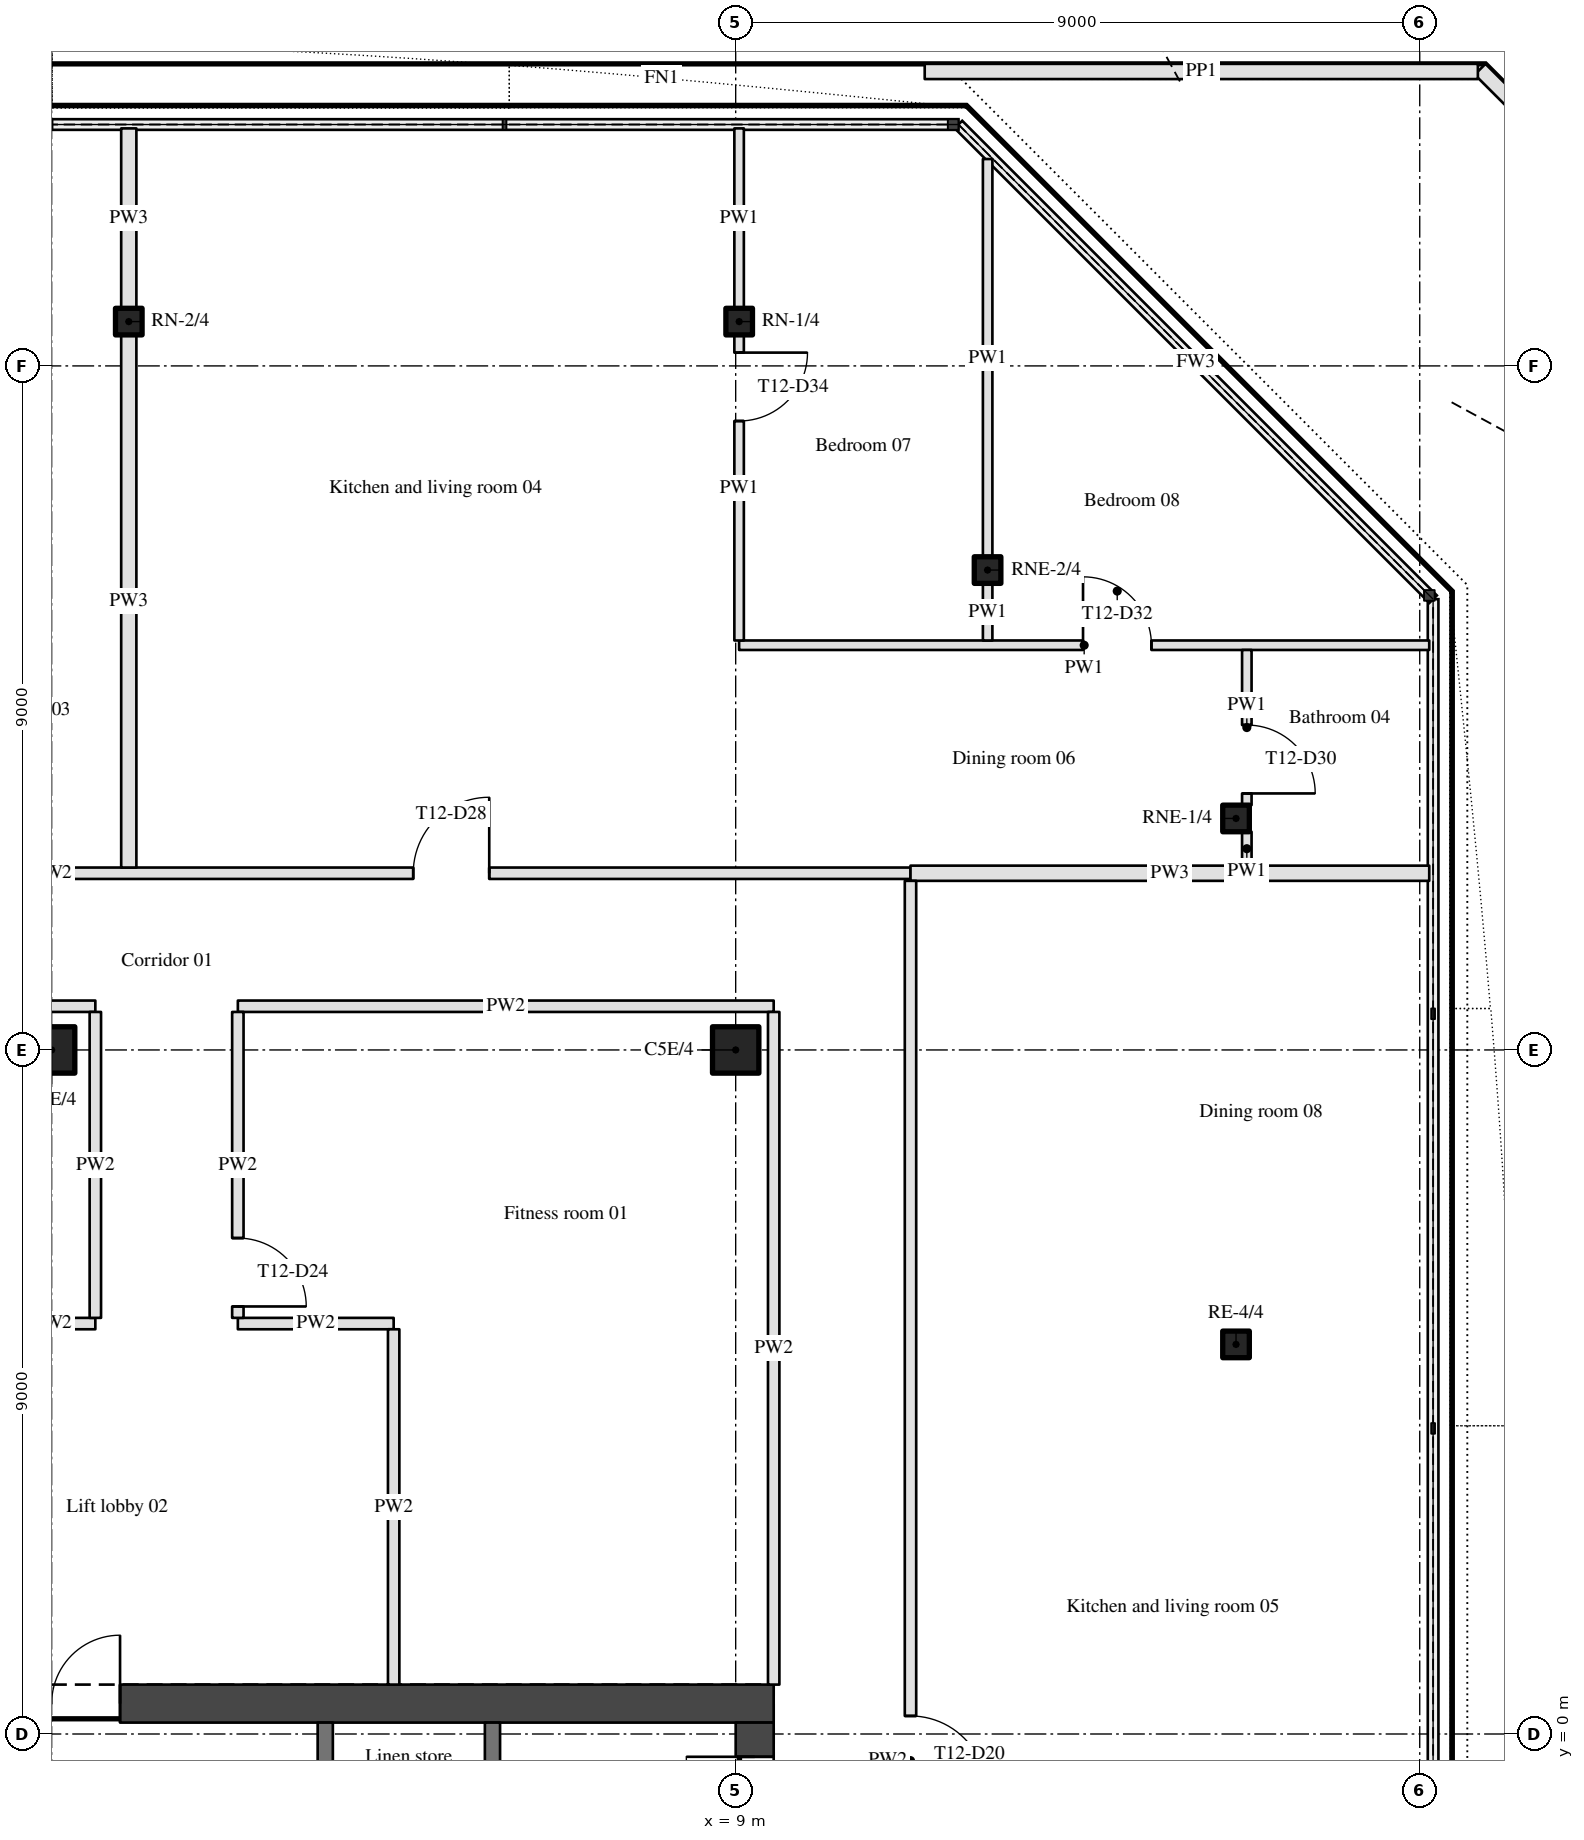
"""IFC4 building model, lengths in metres.
Left out: names, types, materials, properties, quantities, classifications, styles, units other than length and angle.
Written with IfcOpenShell. Run it as: python <this file> out.ifc"""

import sys

from ifc_helpers import new_model, si_unit, direction, frame, frame_2d, origin, origin_2d, place, context, subcontext, project, spatial, rectangle, hollow_rectangle, hollow_circle, extrude, element, fill, save


model = new_model("IFC4")
c1 = context("Model", 3, precision=1e-05, world=origin(), true_north=direction((0.0, 1.0)))
c2 = subcontext(c1, "Body", "Model", "MODEL_VIEW")
j1 = project(units=[si_unit("LENGTHUNIT", "METRE"), si_unit("PLANEANGLEUNIT", "RADIAN")], contexts=[c1])
p1 = place(None, origin())
s1 = spatial("IfcSite", under=j1, at=p1, CompositionType="ELEMENT")
p2 = place(p1, origin())
s2 = spatial("IfcBuilding", under=s1, at=p2, CompositionType="ELEMENT")
p3 = place(p2, frame((0.0, 0.0, 172.2)))
s3 = spatial("IfcBuildingStorey", under=s2, at=p3, CompositionType="ELEMENT", Elevation=172.2)
for number, where, z_axis, x_axis in (
    (1, (0.0, 9.0, 0.0), (0.0, 0.0, 1.0), (1.0, 0.0, 0.0)),
    (2, (9.0, 9.0, 0.0), (0.0, 0.0, 1.0), (1.0, 0.0, 0.0)),
):
    element("IfcColumn", number, at=place(p3, frame(where, z_axis=z_axis, x_axis=x_axis)), inside=s3, PredefinedType="COLUMN", context=c2, shape_type="SweptSolid", body=[
        extrude(hollow_circle(Radius=0.305, WallThickness=0.03, at=origin_2d()), origin(), (0.0, 0.0, 1.0), 3.15),
    ])
for number, where, z_axis, x_axis in (
    (3, (15.583, 5.126, 0.0), (0.0, 0.0, 1.0), (1.0, 0.0, 0.0)),
    (4, (15.583, 12.046, 0.0), (0.0, 0.0, 1.0), (1.0, 0.0, 0.0)),
    (5, (12.314, 15.314, 0.0), (0.0, 0.0, 1.0), (1.0, 0.0, 0.0)),
    (6, (9.046, 18.583, 0.0), (0.0, 0.0, 1.0), (1.0, 0.0, 0.0)),
    (7, (1.015, 18.583, 0.0), (0.0, 0.0, 1.0), (1.0, 0.0, 0.0)),
):
    element("IfcColumn", number, at=place(p3, frame(where, z_axis=z_axis, x_axis=x_axis)), inside=s3, PredefinedType="COLUMN", context=c2, shape_type="SweptSolid", body=[
        extrude(hollow_rectangle(XDim=0.35, YDim=0.35, WallThickness=0.02, InnerFilletRadius=0.03, OuterFilletRadius=0.05, at=origin_2d()), origin(), (0.0, 0.0, 1.0), 3.15),
    ])
p4 = place(p3, frame((-9.5, 0.4, 0.0), z_axis=(0.0, 0.0, 1.0), x_axis=(1.0, 0.0, 0.0)))
e8 = element("IfcWall", 8, at=p4, inside=s3, PredefinedType="SHEAR", context=c2, shape_type="SweptSolid", body=[
    extrude(rectangle(XDim=19.0, YDim=0.5, at=frame_2d((9.5, 0.0))), origin(), (0.0, 0.0, 1.0), 3.15),
])
p5 = place(p4, frame((8.6, 0.0, 0.0)))
e9 = element("IfcOpeningElement", 9, at=p5, cuts=e8, PredefinedType="OPENING", context=c2, shape_type="SweptSolid", body=[
    extrude(rectangle(XDim=1.8, YDim=2.1, at=frame_2d((0.9, 1.05))), frame((0.0, 0.26, 0.0), z_axis=(0.0, -1.0, 0.0), x_axis=(1.0, 0.0, 0.0)), (0.0, 0.0, 1.0), 0.52),
])
p6 = place(p3, frame((9.25, -11.5, 0.0), z_axis=(0.0, 0.0, 1.0), x_axis=(0.0, 1.0, 0.0)))
e10 = element("IfcWall", 10, at=p6, inside=s3, PredefinedType="SHEAR", context=c2, shape_type="SweptSolid", body=[
    extrude(rectangle(XDim=11.65, YDim=0.5, at=frame_2d((5.825, 0.0))), origin(), (0.0, 0.0, 1.0), 3.15),
])
p7 = place(p6, frame((9.4, 0.0, 0.0)))
e11 = element("IfcOpeningElement", 11, at=p7, cuts=e10, PredefinedType="OPENING", context=c2, shape_type="SweptSolid", body=[
    extrude(rectangle(XDim=1.8, YDim=2.1, at=frame_2d((0.9, 1.05))), frame((0.0, 0.26, 0.0), z_axis=(0.0, -1.0, 0.0), x_axis=(1.0, 0.0, 0.0)), (0.0, 0.0, 1.0), 0.52),
])
p8 = place(p3, frame((24.833, 15.865, 0.0), z_axis=(0.0, 0.0, 1.0), x_axis=(-0.707106781187, 0.707106781187, 0.0)))
e12 = element("IfcWall", 12, at=p8, inside=s3, PredefinedType="PARAPET", context=c2, shape_type="SweptSolid", body=[
    extrude(rectangle(XDim=8.54, YDim=0.2, at=frame_2d((4.27, 0.0))), origin(), (0.0, 0.0, 1.0), 1.0),
])
p9 = place(p3, frame((18.765, 21.874, 0.0), z_axis=(0.0, 0.0, 1.0), x_axis=(-1.0, 0.0, 0.0)))
e13 = element("IfcWall", 13, at=p9, inside=s3, PredefinedType="PARAPET", context=c2, shape_type="SweptSolid", body=[
    extrude(rectangle(XDim=7.278, YDim=0.2, at=frame_2d((3.639, 0.0))), origin(), (0.0, 0.0, 1.0), 1.0),
])
p10 = place(p3, frame((-0.55, 5.4, 0.0), z_axis=(0.0, 0.0, 1.0), x_axis=(1.0, 0.0, 0.0)))
e14 = element("IfcWall", 14, at=p10, inside=s3, PredefinedType="PARTITIONING", context=c2, shape_type="SweptSolid", body=[
    extrude(rectangle(XDim=1.125, YDim=0.15, at=frame_2d((0.562, 0.0))), origin(), (0.0, 0.0, 1.0), 2.21),
])
p11 = place(p3, frame((2.45, 5.4, 0.0), z_axis=(0.0, 0.0, 1.0), x_axis=(1.0, 0.0, 0.0)))
e15 = element("IfcWall", 15, at=p11, inside=s3, PredefinedType="PARTITIONING", context=c2, shape_type="SweptSolid", body=[
    extrude(rectangle(XDim=2.05, YDim=0.15, at=frame_2d((1.025, 0.0))), origin(), (0.0, 0.0, 1.0), 2.21),
])
p12 = place(p3, frame((0.575, 9.575, 0.0), z_axis=(0.0, 0.0, 1.0), x_axis=(-1.0, 0.0, 0.0)))
e16 = element("IfcWall", 16, at=p12, inside=s3, PredefinedType="PARTITIONING", context=c2, shape_type="SweptSolid", body=[
    extrude(rectangle(XDim=10.075, YDim=0.15, at=frame_2d((5.038, 0.0))), origin(), (0.0, 0.0, 1.0), 2.21),
])
p13 = place(p12, frame((8.125, 0.0, 0.0)))
e17 = element("IfcOpeningElement", 17, at=p13, cuts=e16, PredefinedType="OPENING", context=c2, shape_type="SweptSolid", body=[
    extrude(rectangle(XDim=0.9, YDim=2.1, at=frame_2d((0.45, 1.05))), frame((0.0, 0.085, 0.0), z_axis=(0.0, -1.0, 0.0), x_axis=(1.0, 0.0, 0.0)), (0.0, 0.0, 1.0), 0.17),
])
p14 = place(p3, frame((2.45, 9.575, 0.0), z_axis=(0.0, 0.0, 1.0), x_axis=(1.0, 0.0, 0.0)))
e18 = element("IfcWall", 18, at=p14, inside=s3, PredefinedType="PARTITIONING", context=c2, shape_type="SweptSolid", body=[
    extrude(rectangle(XDim=7.05, YDim=0.15, at=frame_2d((3.525, 0.0))), origin(), (0.0, 0.0, 1.0), 2.21),
])
p15 = place(p3, frame((-11.275, 11.325, 0.0), z_axis=(0.0, 0.0, 1.0), x_axis=(1.0, 0.0, 0.0)))
e19 = element("IfcWall", 19, at=p15, inside=s3, PredefinedType="PARTITIONING", context=c2, shape_type="SweptSolid", body=[
    extrude(rectangle(XDim=22.575, YDim=0.15, at=frame_2d((11.288, 0.0))), origin(), (0.0, 0.0, 1.0), 2.21),
])
p16 = place(p15, frame((6.795, 0.0, 0.0)))
e20 = element("IfcOpeningElement", 20, at=p16, cuts=e19, PredefinedType="OPENING", context=c2, shape_type="SweptSolid", body=[
    extrude(rectangle(XDim=1.0, YDim=2.1, at=frame_2d((0.5, 1.05))), frame((0.0, 0.085, 0.0), z_axis=(0.0, -1.0, 0.0), x_axis=(1.0, 0.0, 0.0)), (0.0, 0.0, 1.0), 0.17),
])
p17 = place(p15, frame((16.032, 0.0, 0.0)))
e21 = element("IfcOpeningElement", 21, at=p17, cuts=e19, PredefinedType="OPENING", context=c2, shape_type="SweptSolid", body=[
    extrude(rectangle(XDim=1.0, YDim=2.1, at=frame_2d((0.5, 1.05))), frame((0.0, 0.085, 0.0), z_axis=(0.0, -1.0, 0.0), x_axis=(1.0, 0.0, 0.0)), (0.0, 0.0, 1.0), 0.17),
])
p18 = place(p3, frame((11.3, 11.325, 0.0), z_axis=(0.0, 0.0, 1.0), x_axis=(1.0, 0.0, 0.0)))
e22 = element("IfcWall", 22, at=p18, inside=s3, PredefinedType="PARTITIONING", context=c2, shape_type="SweptSolid", body=[
    extrude(rectangle(XDim=6.825, YDim=0.2, at=frame_2d((3.413, 0.0))), origin(), (0.0, 0.0, 1.0), 2.21),
])
p19 = place(p3, frame((9.045, 14.325, 0.0), z_axis=(0.0, 0.0, 1.0), x_axis=(1.0, 0.0, 0.0)))
e23 = element("IfcWall", 23, at=p19, inside=s3, PredefinedType="PARTITIONING", context=c2, shape_type="SweptSolid", body=[
    extrude(rectangle(XDim=9.08, YDim=0.125, at=frame_2d((4.54, 0.0))), origin(), (0.0, 0.0, 1.0), 2.21),
])
p20 = place(p19, frame((4.525, 0.0, 0.0)))
e24 = element("IfcOpeningElement", 24, at=p20, cuts=e23, PredefinedType="OPENING", context=c2, shape_type="SweptSolid", body=[
    extrude(rectangle(XDim=0.9, YDim=2.1, at=frame_2d((0.45, 1.05))), frame((0.0, 0.073, 0.0), z_axis=(0.0, -1.0, 0.0), x_axis=(1.0, 0.0, 0.0)), (0.0, 0.0, 1.0), 0.145),
])
p21 = place(p3, frame((0.575, 5.475, 0.0), z_axis=(0.0, 0.0, 1.0), x_axis=(0.0, 1.0, 0.0)))
e25 = element("IfcWall", 25, at=p21, inside=s3, PredefinedType="PARTITIONING", context=c2, shape_type="SweptSolid", body=[
    extrude(rectangle(XDim=4.025, YDim=0.15, at=frame_2d((2.012, 0.0))), origin(), (0.0, 0.0, 1.0), 2.21),
])
p22 = place(p3, frame((1.015, 11.4, 0.0), z_axis=(0.0, 0.0, 1.0), x_axis=(0.0, 1.0, 0.0)))
e26 = element("IfcWall", 26, at=p22, inside=s3, PredefinedType="PARTITIONING", context=c2, shape_type="SweptSolid", body=[
    extrude(rectangle(XDim=7.008, YDim=0.2, at=frame_2d((3.504, 0.0))), origin(), (0.0, 0.0, 1.0), 2.21),
])
p23 = place(p3, frame((1.015, 18.758, 0.0), z_axis=(0.0, 0.0, 1.0), x_axis=(0.0, 1.0, 0.0)))
e27 = element("IfcWall", 27, at=p23, inside=s3, PredefinedType="PARTITIONING", context=c2, shape_type="SweptSolid", body=[
    extrude(rectangle(XDim=2.367, YDim=0.2, at=frame_2d((1.184, 0.0))), origin(), (0.0, 0.0, 1.0), 2.21),
])
p24 = place(p3, frame((2.45, 9.5, 0.0), z_axis=(0.0, 0.0, 1.0), x_axis=(0.0, -1.0, 0.0)))
e28 = element("IfcWall", 28, at=p24, inside=s3, PredefinedType="PARTITIONING", context=c2, shape_type="SweptSolid", body=[
    extrude(rectangle(XDim=4.025, YDim=0.15, at=frame_2d((2.012, 0.0))), origin(), (0.0, 0.0, 1.0), 2.21),
])
p25 = place(p24, frame((2.975, 0.0, 0.0)))
e29 = element("IfcOpeningElement", 29, at=p25, cuts=e28, PredefinedType="OPENING", context=c2, shape_type="SweptSolid", body=[
    extrude(rectangle(XDim=0.9, YDim=2.1, at=frame_2d((0.45, 1.05))), frame((0.0, 0.085, 0.0), z_axis=(0.0, -1.0, 0.0), x_axis=(1.0, 0.0, 0.0)), (0.0, 0.0, 1.0), 0.17),
])
p26 = place(p3, frame((3.6, -1.1, 0.0), z_axis=(0.0, 0.0, 1.0), x_axis=(0.0, 1.0, 0.0)))
e30 = element("IfcWall", 30, at=p26, inside=s3, PredefinedType="SOLIDWALL", context=c2, shape_type="SweptSolid", body=[
    extrude(rectangle(XDim=1.25, YDim=0.2, at=frame_2d((0.625, 0.0))), origin(), (0.0, 0.0, 1.0), 2.85),
])
p27 = place(p3, frame((4.5, 0.65, 0.0), z_axis=(0.0, 0.0, 1.0), x_axis=(0.0, 1.0, 0.0)))
e31 = element("IfcWall", 31, at=p27, inside=s3, PredefinedType="PARTITIONING", context=c2, shape_type="SweptSolid", body=[
    extrude(rectangle(XDim=4.675, YDim=0.15, at=frame_2d((2.337, 0.0))), origin(), (0.0, 0.0, 1.0), 2.21),
])
p28 = place(p3, frame((5.8, -1.1, 0.0), z_axis=(0.0, 0.0, 1.0), x_axis=(0.0, 1.0, 0.0)))
e32 = element("IfcWall", 32, at=p28, inside=s3, PredefinedType="SOLIDWALL", context=c2, shape_type="SweptSolid", body=[
    extrude(rectangle(XDim=1.25, YDim=0.2, at=frame_2d((0.625, 0.0))), origin(), (0.0, 0.0, 1.0), 2.85),
])
p29 = place(p3, frame((9.045, 18.408, 0.0), z_axis=(0.0, 0.0, 1.0), x_axis=(0.0, -1.0, 0.0)))
e33 = element("IfcWall", 33, at=p29, inside=s3, PredefinedType="PARTITIONING", context=c2, shape_type="SweptSolid", body=[
    extrude(rectangle(XDim=4.021, YDim=0.125, at=frame_2d((2.01, 0.0))), origin(), (0.0, 0.0, 1.0), 2.21),
])
p30 = place(p29, frame((0.233, 0.0, 0.0)))
e34 = element("IfcOpeningElement", 34, at=p30, cuts=e33, PredefinedType="OPENING", context=c2, shape_type="SweptSolid", body=[
    extrude(rectangle(XDim=0.9, YDim=2.1, at=frame_2d((0.45, 1.05))), frame((0.0, 0.073, 0.0), z_axis=(0.0, -1.0, 0.0), x_axis=(1.0, 0.0, 0.0)), (0.0, 0.0, 1.0), 0.145),
])
p31 = place(p3, frame((9.045, 18.758, 0.0), z_axis=(0.0, 0.0, 1.0), x_axis=(0.0, 1.0, 0.0)))
e35 = element("IfcWall", 35, at=p31, inside=s3, PredefinedType="PARTITIONING", context=c2, shape_type="SweptSolid", body=[
    extrude(rectangle(XDim=2.367, YDim=0.125, at=frame_2d((1.184, 0.0))), origin(), (0.0, 0.0, 1.0), 2.21),
])
p32 = place(p3, frame((9.5, 0.65, 0.0), z_axis=(0.0, 0.0, 1.0), x_axis=(0.0, 1.0, 0.0)))
e36 = element("IfcWall", 36, at=p32, inside=s3, PredefinedType="PARTITIONING", context=c2, shape_type="SweptSolid", body=[
    extrude(rectangle(XDim=8.85, YDim=0.15, at=frame_2d((4.425, 0.0))), origin(), (0.0, 0.0, 1.0), 2.21),
])
p33 = place(p3, frame((11.3, 11.225, 0.0), z_axis=(0.0, 0.0, 1.0), x_axis=(0.0, -1.0, 0.0)))
e37 = element("IfcWall", 37, at=p33, inside=s3, PredefinedType="PARTITIONING", context=c2, shape_type="SweptSolid", body=[
    extrude(rectangle(XDim=23.15, YDim=0.15, at=frame_2d((11.575, 0.0))), origin(), (0.0, 0.0, 1.0), 2.21),
])
p34 = place(p33, frame((10.988, 0.0, 0.0)))
e38 = element("IfcOpeningElement", 38, at=p34, cuts=e37, PredefinedType="OPENING", context=c2, shape_type="SweptSolid", body=[
    extrude(rectangle(XDim=1.0, YDim=2.1, at=frame_2d((0.5, 1.05))), frame((0.0, 0.085, 0.0), z_axis=(0.0, -1.0, 0.0), x_axis=(1.0, 0.0, 0.0)), (0.0, 0.0, 1.0), 0.17),
])
p35 = place(p3, frame((12.315, 14.387, 0.0), z_axis=(0.0, 0.0, 1.0), x_axis=(0.0, 1.0, 0.0)))
e39 = element("IfcWall", 39, at=p35, inside=s3, PredefinedType="PARTITIONING", context=c2, shape_type="SweptSolid", body=[
    extrude(rectangle(XDim=0.751, YDim=0.125, at=frame_2d((0.376, 0.0))), origin(), (0.0, 0.0, 1.0), 2.21),
])
p36 = place(p3, frame((12.315, 15.489, 0.0), z_axis=(0.0, 0.0, 1.0), x_axis=(0.0, 1.0, 0.0)))
e40 = element("IfcWall", 40, at=p36, inside=s3, PredefinedType="PARTITIONING", context=c2, shape_type="SweptSolid", body=[
    extrude(rectangle(XDim=5.233, YDim=0.125, at=frame_2d((2.616, 0.0))), origin(), (0.0, 0.0, 1.0), 2.21),
])
p37 = place(p3, frame((15.725, 11.425, 0.0), z_axis=(0.0, 0.0, 1.0), x_axis=(0.0, 1.0, 0.0)))
e41 = element("IfcWall", 41, at=p37, inside=s3, PredefinedType="PARTITIONING", context=c2, shape_type="SweptSolid", body=[
    extrude(rectangle(XDim=0.446, YDim=0.125, at=frame_2d((0.223, 0.0))), origin(), (0.0, 0.0, 1.0), 2.21),
])
p38 = place(p3, frame((15.725, 14.262, 0.0), z_axis=(0.0, 0.0, 1.0), x_axis=(0.0, -1.0, 0.0)))
e42 = element("IfcWall", 42, at=p38, inside=s3, PredefinedType="PARTITIONING", context=c2, shape_type="SweptSolid", body=[
    extrude(rectangle(XDim=2.042, YDim=0.125, at=frame_2d((1.021, 0.0))), origin(), (0.0, 0.0, 1.0), 2.21),
])
p39 = place(p38, frame((0.988, 0.0, 0.0)))
e43 = element("IfcOpeningElement", 43, at=p39, cuts=e42, PredefinedType="OPENING", context=c2, shape_type="SweptSolid", body=[
    extrude(rectangle(XDim=0.9, YDim=2.1, at=frame_2d((0.45, 1.05))), frame((0.0, 0.073, 0.0), z_axis=(0.0, -1.0, 0.0), x_axis=(1.0, 0.0, 0.0)), (0.0, 0.0, 1.0), 0.145),
])
p40 = place(p34, origin())
e44 = element("IfcDoor", 44, at=p40, inside=s3, OperationType="SINGLE_SWING_RIGHT", PredefinedType="DOOR", context=c2, shape_type="SweptSolid", body=[
    extrude(rectangle(XDim=1.0, YDim=2.1, at=frame_2d((0.5, 1.05))), frame((0.0, 0.025, 0.0), z_axis=(0.0, -1.0, 0.0), x_axis=(1.0, 0.0, 0.0)), (0.0, 0.0, 1.0), 0.05),
])
fill(e38, e44)
p41 = place(p7, origin())
e45 = element("IfcDoor", 45, at=p41, inside=s3, OperationType="DOUBLE_DOOR_SINGLE_SWING", PredefinedType="DOOR", context=c2, shape_type="SweptSolid", body=[
    extrude(rectangle(XDim=1.8, YDim=2.1, at=frame_2d((0.9, 1.05))), frame((0.0, 0.025, 0.0), z_axis=(0.0, -1.0, 0.0), x_axis=(1.0, 0.0, 0.0)), (0.0, 0.0, 1.0), 0.05),
])
fill(e11, e45)
p42 = place(p17, origin())
e46 = element("IfcDoor", 46, at=p42, inside=s3, OperationType="SINGLE_SWING_RIGHT", PredefinedType="DOOR", context=c2, shape_type="SweptSolid", body=[
    extrude(rectangle(XDim=1.0, YDim=2.1, at=frame_2d((0.5, 1.05))), frame((0.0, 0.025, 0.0), z_axis=(0.0, -1.0, 0.0), x_axis=(1.0, 0.0, 0.0)), (0.0, 0.0, 1.0), 0.05),
])
fill(e21, e46)
p43 = place(p5, origin())
e47 = element("IfcDoor", 47, at=p43, inside=s3, OperationType="DOUBLE_DOOR_SINGLE_SWING", PredefinedType="DOOR", context=c2, shape_type="SweptSolid", body=[
    extrude(rectangle(XDim=1.8, YDim=2.1, at=frame_2d((0.9, 1.05))), frame((0.0, 0.025, 0.0), z_axis=(0.0, -1.0, 0.0), x_axis=(1.0, 0.0, 0.0)), (0.0, 0.0, 1.0), 0.05),
])
fill(e9, e47)
p44 = place(p25, origin())
e48 = element("IfcDoor", 48, at=p44, inside=s3, OperationType="SINGLE_SWING_RIGHT", PredefinedType="DOOR", context=c2, shape_type="SweptSolid", body=[
    extrude(rectangle(XDim=0.9, YDim=2.1, at=frame_2d((0.45, 1.05))), frame((0.0, 0.025, 0.0), z_axis=(0.0, -1.0, 0.0), x_axis=(1.0, 0.0, 0.0)), (0.0, 0.0, 1.0), 0.05),
])
fill(e29, e48)
p45 = place(p39, origin())
e49 = element("IfcDoor", 49, at=p45, inside=s3, OperationType="SINGLE_SWING_RIGHT", PredefinedType="DOOR", context=c2, shape_type="SweptSolid", body=[
    extrude(rectangle(XDim=0.9, YDim=2.1, at=frame_2d((0.45, 1.05))), frame((0.0, 0.025, 0.0), z_axis=(0.0, -1.0, 0.0), x_axis=(1.0, 0.0, 0.0)), (0.0, 0.0, 1.0), 0.05),
])
fill(e43, e49)
p46 = place(p20, origin())
e50 = element("IfcDoor", 50, at=p46, inside=s3, OperationType="SINGLE_SWING_LEFT", PredefinedType="DOOR", context=c2, shape_type="SweptSolid", body=[
    extrude(rectangle(XDim=0.9, YDim=2.1, at=frame_2d((0.45, 1.05))), frame((0.0, 0.025, 0.0), z_axis=(0.0, -1.0, 0.0), x_axis=(1.0, 0.0, 0.0)), (0.0, 0.0, 1.0), 0.05),
])
fill(e24, e50)
p47 = place(p30, origin())
e51 = element("IfcDoor", 51, at=p47, inside=s3, OperationType="SINGLE_SWING_LEFT", PredefinedType="DOOR", context=c2, shape_type="SweptSolid", body=[
    extrude(rectangle(XDim=0.9, YDim=2.1, at=frame_2d((0.45, 1.05))), frame((0.0, 0.025, 0.0), z_axis=(0.0, -1.0, 0.0), x_axis=(1.0, 0.0, 0.0)), (0.0, 0.0, 1.0), 0.05),
])
fill(e34, e51)
save(model, sys.argv[1])
